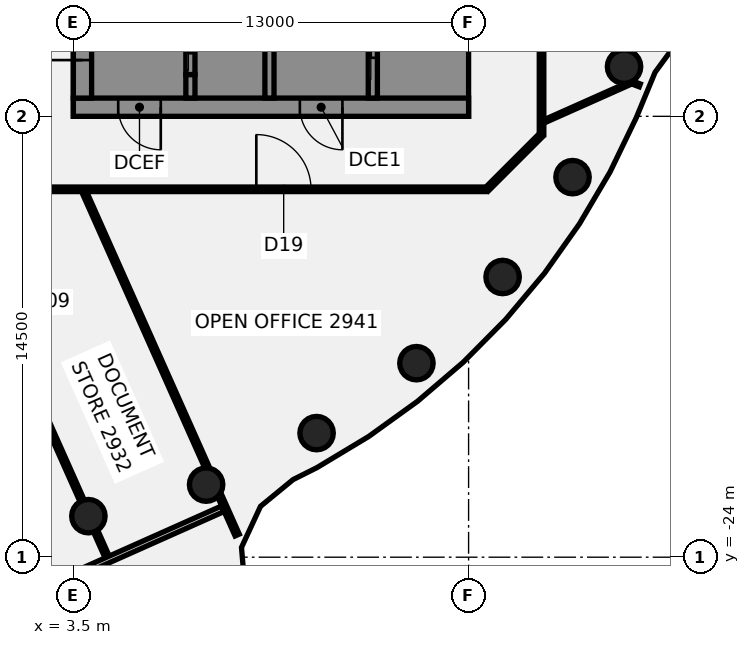
"""IFC4 building model, lengths in metres.
Left out: names, types, materials, properties, quantities, classifications, styles, units other than length and angle.
Written with IfcOpenShell. Run it as: python <this file> out.ifc"""

import sys

from ifc_helpers import new_model, si_unit, direction, frame, frame_2d, origin, origin_2d, place, context, subcontext, project, spatial, polyline, rectangle, circle, outline, extrude, element, fill, save


model = new_model("IFC4")
c1 = context("Model", 3, precision=1e-05, world=origin(), true_north=direction((0.0, 1.0)))
c2 = subcontext(c1, "Body", "Model", "MODEL_VIEW")
j1 = project(units=[si_unit("LENGTHUNIT", "METRE"), si_unit("PLANEANGLEUNIT", "RADIAN")], contexts=[c1])
p1 = place(None, origin())
s1 = spatial("IfcSite", under=j1, at=p1, CompositionType="ELEMENT")
p2 = place(p1, origin())
s2 = spatial("IfcBuilding", under=s1, at=p2, CompositionType="ELEMENT")
p3 = place(p2, frame((0.0, 0.0, 121.0)))
s3 = spatial("IfcBuildingStorey", under=s2, at=p3, CompositionType="ELEMENT", Elevation=121.0)
for number, where, z_axis, x_axis in (
    (1, (3.994, -22.651, -0.14), (0.0, 0.0, 1.0), (1.0, 0.0, 0.0)),
    (2, (7.866, -21.613, -0.14), (0.0, 0.0, 1.0), (1.0, 0.0, 0.0)),
    (3, (11.5, -19.919, -0.14), (0.0, 0.0, 1.0), (1.0, 0.0, 0.0)),
    (4, (14.784, -17.619, -0.14), (0.0, 0.0, 1.0), (1.0, 0.0, 0.0)),
    (5, (17.619, -14.784, -0.14), (0.0, 0.0, 1.0), (1.0, 0.0, 0.0)),
    (6, (19.919, -11.5, -0.14), (0.0, 0.0, 1.0), (1.0, 0.0, 0.0)),
    (7, (21.613, -7.866, -0.14), (0.0, 0.0, 1.0), (1.0, 0.0, 0.0)),
):
    element("IfcColumn", number, at=place(p3, frame(where, z_axis=z_axis, x_axis=x_axis)), inside=s3, PredefinedType="COLUMN", context=c2, shape_type="SweptSolid", body=[
        extrude(circle(Radius=0.55, at=origin_2d()), origin(), (0.0, 0.0, 1.0), 3.75),
    ])
p4 = place(p3, frame((-0.742, -11.987, 0.0), z_axis=(0.0, 0.0, 1.0), x_axis=(0.407260264748, -0.913312146398, 0.0)))
e8 = element("IfcWall", 8, at=p4, inside=s3, PredefinedType="PARTITIONING", context=c2, shape_type="SweptSolid", body=[
    extrude(rectangle(XDim=11.123, YDim=0.15, at=frame_2d((5.562, 0.0))), origin(), (0.0, 0.0, 1.0), 3.01),
])
p5 = place(p4, frame((3.505, 0.0, 0.0)))
e9 = element("IfcOpeningElement", 9, at=p5, cuts=e8, PredefinedType="OPENING", context=c2, shape_type="SweptSolid", body=[
    extrude(rectangle(XDim=0.9, YDim=2.1, at=frame_2d((0.45, 1.05))), frame((0.0, 0.085, 0.0), z_axis=(0.0, -1.0, 0.0), x_axis=(1.0, 0.0, 0.0)), (0.0, 0.0, 1.0), 0.17),
])
p6 = place(p3, frame((4.234, -23.146, 0.0), z_axis=(0.0, 0.0, 1.0), x_axis=(0.407241569405, -0.913320482716, 0.0)))
e10 = element("IfcWall", 10, at=p6, inside=s3, PredefinedType="PARTITIONING", context=c2, shape_type="SweptSolid", body=[
    extrude(rectangle(XDim=0.924, YDim=0.15, at=frame_2d((0.462, 0.0))), origin(), (0.0, 0.0, 1.0), 3.01),
])
p7 = place(p3, frame((3.857, -11.987, 0.0), z_axis=(0.0, 0.0, 1.0), x_axis=(0.407232319001, -0.913324607334, 0.0)))
e11 = element("IfcWall", 11, at=p7, inside=s3, PredefinedType="PARTITIONING", context=c2, shape_type="SweptSolid", body=[
    extrude(rectangle(XDim=9.938, YDim=0.15, at=frame_2d((4.969, 0.0))), origin(), (0.0, 0.0, 1.0), 3.01),
])
p8 = place(p3, frame((8.298, -21.947, 0.0), z_axis=(0.0, 0.0, 1.0), x_axis=(0.407232016683, -0.913324742131, 0.0)))
e12 = element("IfcWall", 12, at=p8, inside=s3, PredefinedType="PARTITIONING", context=c2, shape_type="SweptSolid", body=[
    extrude(rectangle(XDim=1.45, YDim=0.15, at=frame_2d((0.725, 0.0))), origin(), (0.0, 0.0, 1.0), 3.01),
])
p9 = place(p3, frame((21.923, -8.402, 0.0), z_axis=(0.0, 0.0, 1.0), x_axis=(0.934418057451, -0.356178177193, 0.0)))
e13 = element("IfcWall", 13, at=p9, inside=s3, PredefinedType="PARTITIONING", context=c2, shape_type="SweptSolid", body=[
    extrude(rectangle(XDim=0.222, YDim=0.1, at=frame_2d((0.111, 0.0))), origin(), (0.0, 0.0, 1.0), 3.01),
])
p10 = place(p3, frame((-17.1, -11.9, 0.0), z_axis=(0.0, 0.0, 1.0), x_axis=(1.0, 0.0, 0.0)))
e14 = element("IfcWall", 14, at=p10, inside=s3, PredefinedType="PARTITIONING", context=c2, shape_type="SweptSolid", body=[
    extrude(rectangle(XDim=34.165, YDim=0.15, at=frame_2d((17.083, 0.0))), origin(), (0.0, 0.0, 1.0), 3.01),
])
p11 = place(p10, frame((11.724, 0.0, 0.0)))
e15 = element("IfcOpeningElement", 15, at=p11, cuts=e14, PredefinedType="OPENING", context=c2, shape_type="SweptSolid", body=[
    extrude(rectangle(XDim=1.8, YDim=2.1, at=frame_2d((0.9, 1.05))), frame((0.0, 0.085, 0.0), z_axis=(0.0, -1.0, 0.0), x_axis=(1.0, 0.0, 0.0)), (0.0, 0.0, 1.0), 0.17),
])
p12 = place(p10, frame((1.35, 0.0, 0.0)))
e16 = element("IfcOpeningElement", 16, at=p12, cuts=e14, PredefinedType="OPENING", context=c2, shape_type="SweptSolid", body=[
    extrude(rectangle(XDim=1.8, YDim=2.1, at=frame_2d((0.9, 1.05))), frame((0.0, 0.085, 0.0), z_axis=(0.0, -1.0, 0.0), x_axis=(1.0, 0.0, 0.0)), (0.0, 0.0, 1.0), 0.17),
])
p13 = place(p10, frame((26.618, 0.0, 0.0)))
e17 = element("IfcOpeningElement", 17, at=p13, cuts=e14, PredefinedType="OPENING", context=c2, shape_type="SweptSolid", body=[
    extrude(rectangle(XDim=1.8, YDim=2.1, at=frame_2d((0.9, 1.05))), frame((0.0, 0.085, 0.0), z_axis=(0.0, -1.0, 0.0), x_axis=(1.0, 0.0, 0.0)), (0.0, 0.0, 1.0), 0.17),
])
p14 = place(p3, frame((-4.571, -28.198, 0.0), z_axis=(0.0, 0.0, 1.0), x_axis=(0.913300332542, 0.407286757186, 0.0)))
e18 = element("IfcWall", 18, at=p14, inside=s3, PredefinedType="PARTITIONING", context=c2, shape_type="SweptSolid", body=[
    extrude(rectangle(XDim=14.219, YDim=0.2, at=frame_2d((7.11, 0.0))), origin(), (0.0, 0.0, 1.0), 3.01),
])
p15 = place(p14, frame((6.099, 0.0, 0.0)))
e19 = element("IfcOpeningElement", 19, at=p15, cuts=e18, PredefinedType="OPENING", context=c2, shape_type="SweptSolid", body=[
    extrude(rectangle(XDim=1.4, YDim=2.1, at=frame_2d((0.7, 1.05))), frame((0.0, 0.11, 0.0), z_axis=(0.0, -1.0, 0.0), x_axis=(1.0, 0.0, 0.0)), (0.0, 0.0, 1.0), 0.22),
])
p16 = place(p3, frame((18.978, -9.668, 0.0), z_axis=(0.0, 0.0, 1.0), x_axis=(0.913444648298, 0.406962989099, 0.0)))
e20 = element("IfcWall", 20, at=p16, inside=s3, PredefinedType="PARTITIONING", context=c2, shape_type="SweptSolid", body=[
    extrude(rectangle(XDim=3.214, YDim=0.1, at=frame_2d((1.607, 0.0))), origin(), (0.0, 0.0, 1.0), 3.01),
])
p17 = place(p3, frame((17.1, -11.9, 0.0), z_axis=(0.0, 0.0, 1.0), x_axis=(0.707106781187, 0.707106781187, 0.0)))
e21 = element("IfcWall", 21, at=p17, inside=s3, PredefinedType="PARTITIONING", context=c2, shape_type="SweptSolid", body=[
    extrude(rectangle(XDim=2.505, YDim=0.15, at=frame_2d((1.253, 0.0))), origin(), (0.0, 0.0, 1.0), 3.01),
])
p18 = place(p3, frame((18.9, -10.1, 0.0), z_axis=(0.0, 0.0, 1.0), x_axis=(0.0, 1.0, 0.0)))
e22 = element("IfcWall", 22, at=p18, inside=s3, PredefinedType="PARTITIONING", context=c2, shape_type="SweptSolid", body=[
    extrude(rectangle(XDim=20.2, YDim=0.15, at=frame_2d((10.1, 0.0))), origin(), (0.0, 0.0, 1.0), 3.01),
])
p19 = place(p18, frame((8.595, 0.0, 0.0)))
e23 = element("IfcOpeningElement", 23, at=p19, cuts=e22, PredefinedType="OPENING", context=c2, shape_type="SweptSolid", body=[
    extrude(rectangle(XDim=1.8, YDim=2.1, at=frame_2d((0.9, 1.05))), frame((0.0, 0.085, 0.0), z_axis=(0.0, -1.0, 0.0), x_axis=(1.0, 0.0, 0.0)), (0.0, 0.0, 1.0), 0.17),
])
p20 = place(p18, frame((13.79, 0.0, 0.0)))
e24 = element("IfcOpeningElement", 24, at=p20, cuts=e22, PredefinedType="OPENING", context=c2, shape_type="SweptSolid", body=[
    extrude(rectangle(XDim=0.9, YDim=2.1, at=frame_2d((0.45, 1.05))), frame((0.0, 0.085, 0.0), z_axis=(0.0, -1.0, 0.0), x_axis=(1.0, 0.0, 0.0)), (0.0, 0.0, 1.0), 0.17),
])
p21 = place(p3, frame((16.5, -9.2, 0.0), z_axis=(0.0, 0.0, 1.0), x_axis=(-1.0, 0.0, 0.0)))
e25 = element("IfcWall", 25, at=p21, inside=s3, PredefinedType="SHEAR", context=c2, shape_type="SweptSolid", body=[
    extrude(rectangle(XDim=13.0, YDim=0.6, at=frame_2d((6.5, 0.0))), origin(), (0.0, 0.0, 1.0), 3.61),
])
p22 = place(p21, frame((4.15, 0.0, 0.0)))
e26 = element("IfcOpeningElement", 26, at=p22, cuts=e25, PredefinedType="OPENING", context=c2, shape_type="SweptSolid", body=[
    extrude(rectangle(XDim=1.4, YDim=2.1, at=frame_2d((0.7, 1.05))), frame((0.0, 0.31, 0.0), z_axis=(0.0, -1.0, 0.0), x_axis=(1.0, 0.0, 0.0)), (0.0, 0.0, 1.0), 0.62),
])
p23 = place(p21, frame((10.125, 0.0, 0.0)))
e27 = element("IfcOpeningElement", 27, at=p23, cuts=e25, PredefinedType="OPENING", context=c2, shape_type="SweptSolid", body=[
    extrude(rectangle(XDim=1.4, YDim=2.1, at=frame_2d((0.7, 1.05))), frame((0.0, 0.31, 0.0), z_axis=(0.0, -1.0, 0.0), x_axis=(1.0, 0.0, 0.0)), (0.0, 0.0, 1.0), 0.62),
])
p24 = place(p3, origin())
e28 = element("IfcWall", 28, at=p24, inside=s3, PredefinedType="SHEAR", context=c2, shape_type="SweptSolid", body=[
    extrude(outline(polyline([(13.5, -8.9), (15.9, -8.9), (16.5, -8.9), (16.5, 8.9), (15.9, 8.9), (13.5, 8.9), (13.5, 8.125), (15.9, 8.125), (15.9, 5.625), (13.5, 5.625), (13.5, 5.375), (15.9, 5.375), (15.9, 2.875), (13.5, 2.875), (13.5, 2.625), (15.9, 2.625), (15.9, 0.125), (13.5, 0.125), (13.5, -0.125), (15.9, -0.125), (15.9, -2.625), (13.5, -2.625), (13.5, -2.875), (15.9, -2.875), (15.9, -5.375), (13.5, -5.375), (13.5, -5.625), (15.9, -5.625), (15.9, -8.125), (13.5, -8.125), (13.5, -8.9)])), origin(), (0.0, 0.0, 1.0), 3.61),
])
p25 = place(p3, origin())
e29 = element("IfcWall", 29, at=p25, inside=s3, PredefinedType="SHEAR", context=c2, shape_type="SweptSolid", body=[
    extrude(outline(polyline([(7.5, -8.125), (7.5, -8.9), (9.8, -8.9), (9.8, -8.125), (9.8, -5.625), (9.55, -5.625), (9.55, -8.125), (7.5, -8.125)])), origin(), (0.0, 0.0, 1.0), 3.61),
])
p26 = place(p3, frame((7.35, -8.9, 0.0), z_axis=(0.0, 0.0, 1.0), x_axis=(0.0, 1.0, 0.0)))
e30 = element("IfcWall", 30, at=p26, inside=s3, PredefinedType="SHEAR", context=c2, shape_type="SweptSolid", body=[
    extrude(rectangle(XDim=0.775, YDim=0.3, at=frame_2d((0.387, 0.0))), origin(), (0.0, 0.0, 1.0), 3.61),
])
p27 = place(p3, frame((13.35, -8.9, 0.0), z_axis=(0.0, 0.0, 1.0), x_axis=(0.0, 1.0, 0.0)))
e31 = element("IfcWall", 31, at=p27, inside=s3, PredefinedType="SHEAR", context=c2, shape_type="SweptSolid", body=[
    extrude(rectangle(XDim=17.8, YDim=0.3, at=frame_2d((8.9, 0.0))), origin(), (0.0, 0.0, 1.0), 3.61),
])
p28 = place(p27, frame((1.325, 0.0, 0.0)))
e32 = element("IfcOpeningElement", 32, at=p28, cuts=e31, PredefinedType="OPENING", context=c2, shape_type="SweptSolid", body=[
    extrude(rectangle(XDim=1.4, YDim=2.1, at=frame_2d((0.7, 1.05))), frame((0.0, 0.16, 0.0), z_axis=(0.0, -1.0, 0.0), x_axis=(1.0, 0.0, 0.0)), (0.0, 0.0, 1.0), 0.32),
])
p29 = place(p27, frame((4.225, 0.0, 0.0)))
e33 = element("IfcOpeningElement", 33, at=p29, cuts=e31, PredefinedType="OPENING", context=c2, shape_type="SweptSolid", body=[
    extrude(rectangle(XDim=1.1, YDim=2.1, at=frame_2d((0.55, 1.05))), frame((0.0, 0.16, 0.0), z_axis=(0.0, -1.0, 0.0), x_axis=(1.0, 0.0, 0.0)), (0.0, 0.0, 1.0), 0.32),
])
p30 = place(p27, frame((6.975, 0.0, 0.0)))
e34 = element("IfcOpeningElement", 34, at=p30, cuts=e31, PredefinedType="OPENING", context=c2, shape_type="SweptSolid", body=[
    extrude(rectangle(XDim=1.1, YDim=2.1, at=frame_2d((0.55, 1.05))), frame((0.0, 0.16, 0.0), z_axis=(0.0, -1.0, 0.0), x_axis=(1.0, 0.0, 0.0)), (0.0, 0.0, 1.0), 0.32),
])
p31 = place(p27, frame((9.725, 0.0, 0.0)))
e35 = element("IfcOpeningElement", 35, at=p31, cuts=e31, PredefinedType="OPENING", context=c2, shape_type="SweptSolid", body=[
    extrude(rectangle(XDim=1.1, YDim=2.1, at=frame_2d((0.55, 1.05))), frame((0.0, 0.16, 0.0), z_axis=(0.0, -1.0, 0.0), x_axis=(1.0, 0.0, 0.0)), (0.0, 0.0, 1.0), 0.32),
])
p32 = place(p27, frame((12.475, 0.0, 0.0)))
e36 = element("IfcOpeningElement", 36, at=p32, cuts=e31, PredefinedType="OPENING", context=c2, shape_type="SweptSolid", body=[
    extrude(rectangle(XDim=1.1, YDim=2.1, at=frame_2d((0.55, 1.05))), frame((0.0, 0.16, 0.0), z_axis=(0.0, -1.0, 0.0), x_axis=(1.0, 0.0, 0.0)), (0.0, 0.0, 1.0), 0.32),
])
p33 = place(p3, frame((9.95, -8.9, 0.0), z_axis=(0.0, 0.0, 1.0), x_axis=(0.0, 1.0, 0.0)))
e37 = element("IfcWall", 37, at=p33, inside=s3, PredefinedType="SHEAR", context=c2, shape_type="SweptSolid", body=[
    extrude(rectangle(XDim=17.8, YDim=0.3, at=frame_2d((8.9, 0.0))), origin(), (0.0, 0.0, 1.0), 3.61),
])
p34 = place(p3, frame((7.35, -8.125, 0.0), z_axis=(0.0, 0.0, 1.0), x_axis=(0.0, 1.0, 0.0)))
e38 = element("IfcWall", 38, at=p34, inside=s3, PredefinedType="SHEAR", context=c2, shape_type="SweptSolid", body=[
    extrude(rectangle(XDim=2.5, YDim=0.3, at=frame_2d((1.25, 0.0))), origin(), (0.0, 0.0, 1.0), 3.61),
])
p35 = place(p34, frame((0.7, 0.0, 0.0)))
e39 = element("IfcOpeningElement", 39, at=p35, cuts=e38, PredefinedType="OPENING", context=c2, shape_type="SweptSolid", body=[
    extrude(rectangle(XDim=1.1, YDim=2.1, at=frame_2d((0.55, 1.05))), frame((0.0, 0.16, 0.0), z_axis=(0.0, -1.0, 0.0), x_axis=(1.0, 0.0, 0.0)), (0.0, 0.0, 1.0), 0.32),
])
p36 = place(p3, frame((3.8, -8.9, 0.0), z_axis=(0.0, 0.0, 1.0), x_axis=(0.0, 1.0, 0.0)))
e40 = element("IfcWall", 40, at=p36, inside=s3, PredefinedType="SHEAR", context=c2, shape_type="SweptSolid", body=[
    extrude(rectangle(XDim=17.8, YDim=0.6, at=frame_2d((8.9, 0.0))), origin(), (0.0, 0.0, 1.0), 3.61),
])
p37 = place(p36, frame((1.25, 0.0, 0.0)))
e41 = element("IfcOpeningElement", 41, at=p37, cuts=e40, PredefinedType="OPENING", context=c2, shape_type="SweptSolid", body=[
    extrude(rectangle(XDim=1.8, YDim=2.1, at=frame_2d((0.9, 1.05))), frame((0.0, 0.31, 0.0), z_axis=(0.0, -1.0, 0.0), x_axis=(1.0, 0.0, 0.0)), (0.0, 0.0, 1.0), 0.62),
])
p38 = place(p36, frame((12.377, 0.0, 0.0)))
e42 = element("IfcOpeningElement", 42, at=p38, cuts=e40, PredefinedType="OPENING", context=c2, shape_type="SweptSolid", body=[
    extrude(rectangle(XDim=1.0, YDim=2.1, at=frame_2d((0.5, 1.05))), frame((0.0, 0.31, 0.0), z_axis=(0.0, -1.0, 0.0), x_axis=(1.0, 0.0, 0.0)), (0.0, 0.0, 1.0), 0.62),
])
p39 = place(p36, frame((15.903, 0.0, 0.0)))
e43 = element("IfcOpeningElement", 43, at=p39, cuts=e40, PredefinedType="OPENING", context=c2, shape_type="SweptSolid", body=[
    extrude(rectangle(XDim=1.0, YDim=2.1, at=frame_2d((0.5, 1.05))), frame((0.0, 0.31, 0.0), z_axis=(0.0, -1.0, 0.0), x_axis=(1.0, 0.0, 0.0)), (0.0, 0.0, 1.0), 0.62),
])
p40 = place(p13, frame((1.8, 0.0, 0.0), z_axis=(0.0, 0.0, 1.0), x_axis=(-1.0, 0.0, 0.0)))
e44 = element("IfcDoor", 44, at=p40, inside=s3, OperationType="DOUBLE_DOOR_SINGLE_SWING", PredefinedType="DOOR", context=c2, shape_type="SweptSolid", body=[
    extrude(rectangle(XDim=1.8, YDim=2.1, at=frame_2d((0.9, 1.05))), frame((0.0, 0.025, 0.0), z_axis=(0.0, -1.0, 0.0), x_axis=(1.0, 0.0, 0.0)), (0.0, 0.0, 1.0), 0.05),
])
fill(e17, e44)
p41 = place(p22, origin())
e45 = element("IfcDoor", 45, at=p41, inside=s3, OperationType="SINGLE_SWING_LEFT", PredefinedType="DOOR", context=c2, shape_type="SweptSolid", body=[
    extrude(rectangle(XDim=1.4, YDim=2.1, at=frame_2d((0.7, 1.05))), frame((0.0, 0.025, 0.0), z_axis=(0.0, -1.0, 0.0), x_axis=(1.0, 0.0, 0.0)), (0.0, 0.0, 1.0), 0.05),
])
fill(e26, e45)
p42 = place(p23, origin())
e46 = element("IfcDoor", 46, at=p42, inside=s3, OperationType="SINGLE_SWING_LEFT", PredefinedType="DOOR", context=c2, shape_type="SweptSolid", body=[
    extrude(rectangle(XDim=1.4, YDim=2.1, at=frame_2d((0.7, 1.05))), frame((0.0, 0.025, 0.0), z_axis=(0.0, -1.0, 0.0), x_axis=(1.0, 0.0, 0.0)), (0.0, 0.0, 1.0), 0.05),
])
fill(e27, e46)
p43 = place(p37, origin())
e47 = element("IfcDoor", 47, at=p43, inside=s3, OperationType="SINGLE_SWING_LEFT", PredefinedType="DOOR", context=c2, shape_type="SweptSolid", body=[
    extrude(rectangle(XDim=1.8, YDim=2.1, at=frame_2d((0.9, 1.05))), frame((0.0, 0.025, 0.0), z_axis=(0.0, -1.0, 0.0), x_axis=(1.0, 0.0, 0.0)), (0.0, 0.0, 1.0), 0.05),
])
fill(e41, e47)
p44 = place(p28, origin())
e48 = element("IfcDoor", 48, at=p44, inside=s3, OperationType="SLIDING_TO_LEFT", PredefinedType="DOOR", context=c2, shape_type="SweptSolid", body=[
    extrude(rectangle(XDim=1.4, YDim=2.1, at=frame_2d((0.7, 1.05))), frame((0.0, 0.025, 0.0), z_axis=(0.0, -1.0, 0.0), x_axis=(1.0, 0.0, 0.0)), (0.0, 0.0, 1.0), 0.05),
])
fill(e32, e48)
p45 = place(p35, origin())
e49 = element("IfcDoor", 49, at=p45, inside=s3, OperationType="SLIDING_TO_LEFT", PredefinedType="DOOR", context=c2, shape_type="SweptSolid", body=[
    extrude(rectangle(XDim=1.1, YDim=2.1, at=frame_2d((0.55, 1.05))), frame((0.0, 0.025, 0.0), z_axis=(0.0, -1.0, 0.0), x_axis=(1.0, 0.0, 0.0)), (0.0, 0.0, 1.0), 0.05),
])
fill(e39, e49)
save(model, sys.argv[1])
